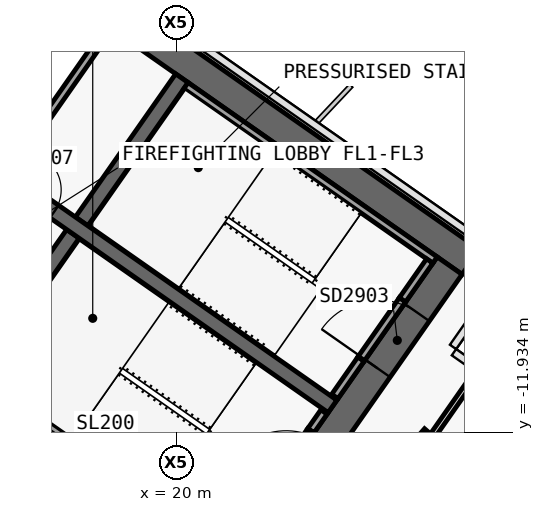
"""IFC4 building model, lengths in metres.
Left out: names, types, materials, properties, quantities, classifications, styles, units other than length and angle.
Written with IfcOpenShell. Run it as: python <this file> out.ifc"""

import sys

from ifc_helpers import new_model, si_unit, direction, frame, frame_2d, origin, place, context, subcontext, project, spatial, polyline, rectangle, outline, extrude, element, fill, save


model = new_model("IFC4")
c1 = context("Model", 3, precision=1e-05, world=origin(), true_north=direction((0.0, 1.0)))
c2 = subcontext(c1, "Body", "Model", "MODEL_VIEW")
j1 = project(units=[si_unit("LENGTHUNIT", "METRE"), si_unit("PLANEANGLEUNIT", "RADIAN")], contexts=[c1])
p1 = place(None, origin())
s1 = spatial("IfcSite", under=j1, at=p1, CompositionType="ELEMENT")
p2 = place(p1, origin())
s2 = spatial("IfcBuilding", under=s1, at=p2, CompositionType="ELEMENT")
p3 = place(p2, frame((0.0, 0.0, 163.2)))
s3 = spatial("IfcBuildingStorey", under=s2, at=p3, CompositionType="ELEMENT", Elevation=163.2)
p4 = place(p3, frame((-0.029, 11.984, 0.0), z_axis=(0.0, 0.0, 1.0), x_axis=(0.819151382952, -0.573577380837, 0.0)))
e1 = element("IfcWall", 1, at=p4, inside=s3, PredefinedType="SHEAR", context=c2, shape_type="SweptSolid", body=[
    extrude(outline(polyline([(33.898, 0.4), (-0.0, 0.4), (0.56, -0.4), (33.898, -0.4), (33.898, 0.4)])), origin(), (0.0, 0.0, 1.0), 3.9),
])
p5 = place(p3, frame((-0.029, -0.712, 0.0), z_axis=(0.0, 0.0, 1.0), x_axis=(0.819151758019, -0.573576845187, 0.0)))
e2 = element("IfcWall", 2, at=p5, inside=s3, PredefinedType="SHEAR", context=c2, shape_type="SweptSolid", body=[
    extrude(outline(polyline([(26.616, 0.4), (-0.0, 0.4), (0.56, -0.4), (26.616, -0.4), (26.616, 0.4)])), origin(), (0.0, 0.0, 1.0), 3.9),
])
p6 = place(p5, frame((6.666, 0.0, 0.0)))
e3 = element("IfcOpeningElement", 3, at=p6, cuts=e2, PredefinedType="OPENING", context=c2, shape_type="SweptSolid", body=[
    extrude(rectangle(XDim=1.5, YDim=2.1, at=frame_2d((0.75, 1.05))), frame((0.0, 0.41, 0.0), z_axis=(0.0, -1.0, 0.0), x_axis=(1.0, 0.0, 0.0)), (0.0, 0.0, 1.0), 0.82),
])
p7 = place(p5, frame((12.366, 0.0, 0.0)))
e4 = element("IfcOpeningElement", 4, at=p7, cuts=e2, PredefinedType="OPENING", context=c2, shape_type="SweptSolid", body=[
    extrude(rectangle(XDim=1.5, YDim=2.1, at=frame_2d((0.75, 1.05))), frame((0.0, 0.41, 0.0), z_axis=(0.0, -1.0, 0.0), x_axis=(1.0, 0.0, 0.0)), (0.0, 0.0, 1.0), 0.82),
])
p8 = place(p3, frame((21.675, -15.421, 0.0), z_axis=(0.0, 0.0, 1.0), x_axis=(0.573581815061, 0.819148278049, 0.0)))
e5 = element("IfcWall", 5, at=p8, inside=s3, PredefinedType="SHEAR", context=c2, shape_type="SweptSolid", body=[
    extrude(outline(polyline([(9.6, 0.4), (0.0, 0.4), (0.0, -0.4), (9.6, -0.4), (9.6, 0.4)])), origin(), (0.0, 0.0, 1.0), 3.9),
])
p9 = place(p8, frame((6.3, 0.0, 0.0)))
e6 = element("IfcOpeningElement", 6, at=p9, cuts=e5, PredefinedType="OPENING", context=c2, shape_type="SweptSolid", body=[
    extrude(rectangle(XDim=1.8, YDim=2.1, at=frame_2d((0.9, 1.05))), frame((0.0, 0.41, 0.0), z_axis=(0.0, -1.0, 0.0), x_axis=(1.0, 0.0, 0.0)), (0.0, 0.0, 1.0), 0.82),
])
p10 = place(p8, frame((2.1, 0.0, 0.0)))
e7 = element("IfcOpeningElement", 7, at=p10, cuts=e5, PredefinedType="OPENING", context=c2, shape_type="SweptSolid", body=[
    extrude(rectangle(XDim=1.8, YDim=2.1, at=frame_2d((0.9, 1.05))), frame((0.0, 0.41, 0.0), z_axis=(0.0, -1.0, 0.0), x_axis=(1.0, 0.0, 0.0)), (0.0, 0.0, 1.0), 0.82),
])
p11 = place(p3, frame((14.63, -10.488, 0.0), z_axis=(0.0, 0.0, 1.0), x_axis=(0.573611936273, 0.819127185829, 0.0)))
e8 = element("IfcWall", 8, at=p11, inside=s3, PredefinedType="SHEAR", context=c2, shape_type="SweptSolid", body=[
    extrude(outline(polyline([(0.0, 0.2), (0.0, -0.2), (4.6, -0.2), (4.6, 0.2), (0.0, 0.2)])), origin(), (0.0, 0.0, 1.0), 3.9),
])
p12 = place(p3, frame((17.498, -6.392, 0.0), z_axis=(0.0, 0.0, 1.0), x_axis=(0.573611936273, 0.819127185829, 0.0)))
e9 = element("IfcWall", 9, at=p12, inside=s3, PredefinedType="SHEAR", context=c2, shape_type="SweptSolid", body=[
    extrude(outline(polyline([(4.6, -0.2), (4.6, 0.2), (0.0, 0.2), (0.0, -0.2), (4.6, -0.2)])), origin(), (0.0, 0.0, 1.0), 3.9),
])
p13 = place(p3, frame((2.638, 3.768, 0.0), z_axis=(0.0, 0.0, 1.0), x_axis=(0.81915267502, -0.573575535572, 0.0)))
e10 = element("IfcWall", 10, at=p13, inside=s3, PredefinedType="SHEAR", context=c2, shape_type="SweptSolid", body=[
    extrude(outline(polyline([(0.0, 0.2), (0.0, -0.2), (26.2, -0.2), (26.2, 0.2), (0.0, 0.2)])), origin(), (0.0, 0.0, 1.0), 3.9),
])
p14 = place(p13, frame((9.637, 0.0, 0.0)))
e11 = element("IfcOpeningElement", 11, at=p14, cuts=e10, PredefinedType="OPENING", context=c2, shape_type="SweptSolid", body=[
    extrude(rectangle(XDim=1.2, YDim=2.1, at=frame_2d((0.6, 1.05))), frame((0.0, 0.21, 0.0), z_axis=(0.0, -1.0, 0.0), x_axis=(1.0, 0.0, 0.0)), (0.0, 0.0, 1.0), 0.42),
])
p15 = place(p13, frame((11.812, 0.0, 0.0)))
e12 = element("IfcOpeningElement", 12, at=p15, cuts=e10, PredefinedType="OPENING", context=c2, shape_type="SweptSolid", body=[
    extrude(rectangle(XDim=1.2, YDim=2.1, at=frame_2d((0.6, 1.05))), frame((0.0, 0.21, 0.0), z_axis=(0.0, -1.0, 0.0), x_axis=(1.0, 0.0, 0.0)), (0.0, 0.0, 1.0), 0.42),
])
p16 = place(p13, frame((13.988, 0.0, 0.0)))
e13 = element("IfcOpeningElement", 13, at=p16, cuts=e10, PredefinedType="OPENING", context=c2, shape_type="SweptSolid", body=[
    extrude(rectangle(XDim=1.2, YDim=2.1, at=frame_2d((0.6, 1.05))), frame((0.0, 0.21, 0.0), z_axis=(0.0, -1.0, 0.0), x_axis=(1.0, 0.0, 0.0)), (0.0, 0.0, 1.0), 0.42),
])
p17 = place(p13, frame((16.262, 0.0, 0.0)))
e14 = element("IfcOpeningElement", 14, at=p17, cuts=e10, PredefinedType="OPENING", context=c2, shape_type="SweptSolid", body=[
    extrude(rectangle(XDim=1.0, YDim=2.1, at=frame_2d((0.5, 1.05))), frame((0.0, 0.21, 0.0), z_axis=(0.0, -1.0, 0.0), x_axis=(1.0, 0.0, 0.0)), (0.0, 0.0, 1.0), 0.42),
])
p18 = place(p3, frame((15.594, -5.059, 0.0), z_axis=(0.0, 0.0, 1.0), x_axis=(0.573540709186, 0.819177059558, 0.0)))
e15 = element("IfcWall", 15, at=p18, inside=s3, PredefinedType="SOLIDWALL", context=c2, shape_type="SweptSolid", body=[
    extrude(rectangle(XDim=4.6, YDim=0.2, at=frame_2d((2.3, 0.0))), origin(), (0.0, 0.0, 1.0), 3.9),
])
p19 = place(p3, frame((20.243, -2.821, 0.0), z_axis=(0.0, 0.0, 1.0), x_axis=(0.819141584393, -0.57359137434, 0.0)))
e16 = element("IfcWall", 16, at=p19, inside=s3, PredefinedType="SOLIDWALL", context=c2, shape_type="SweptSolid", body=[
    extrude(rectangle(XDim=8.0, YDim=0.2, at=frame_2d((4.0, 0.0))), origin(), (0.0, 0.0, 1.0), 3.62),
])
p20 = place(p3, frame((24.162, -10.998, 0.0), z_axis=(0.0, 0.0, 1.0), x_axis=(0.573612502218, 0.819126789514, 0.0)))
e17 = element("IfcWall", 17, at=p20, inside=s3, PredefinedType="SOLIDWALL", context=c2, shape_type="SweptSolid", body=[
    extrude(rectangle(XDim=1.2, YDim=0.2, at=frame_2d((0.6, 0.0))), origin(), (0.0, 0.0, 1.0), 3.62),
])
p21 = place(p3, frame((25.94, -8.458, 0.0), z_axis=(0.0, 0.0, 1.0), x_axis=(0.573619628835, 0.819121798889, 0.0)))
e18 = element("IfcWall", 18, at=p21, inside=s3, PredefinedType="SOLIDWALL", context=c2, shape_type="SweptSolid", body=[
    extrude(rectangle(XDim=1.25, YDim=0.2, at=frame_2d((0.625, 0.0))), origin(), (0.0, 0.0, 1.0), 3.62),
])
p22 = place(p3, frame((24.85, -10.014, 2.15), z_axis=(0.0, 0.0, 1.0), x_axis=(0.573505465124, 0.819201734296, 0.0)))
e19 = element("IfcWall", 19, at=p22, inside=s3, PredefinedType="SOLIDWALL", context=c2, shape_type="SweptSolid", body=[
    extrude(rectangle(XDim=1.9, YDim=0.2, at=frame_2d((0.95, 0.0))), origin(), (0.0, 0.0, 1.0), 1.47),
])
p23 = place(p3, frame((14.851, -10.521, 0.0), z_axis=(0.0, 0.0, 1.0), x_axis=(0.819141584393, -0.57359137434, 0.0)))
e20 = element("IfcWall", 20, at=p23, inside=s3, PredefinedType="SOLIDWALL", context=c2, shape_type="SweptSolid", body=[
    extrude(rectangle(XDim=8.0, YDim=0.2, at=frame_2d((4.0, 0.0))), origin(), (0.0, 0.0, 1.0), 3.62),
])
p24 = place(p3, frame((23.531, -11.898, 0.0), z_axis=(0.0, 0.0, 1.0), x_axis=(0.573708088123, 0.819059844958, 0.0)))
e21 = element("IfcWall", 21, at=p24, inside=s3, PredefinedType="SOLIDWALL", context=c2, shape_type="SweptSolid", body=[
    extrude(rectangle(XDim=0.6, YDim=0.2, at=frame_2d((0.3, 0.0))), origin(), (0.0, 0.0, 1.0), 3.62),
])
p25 = place(p3, frame((22.441, -13.455, 2.15), z_axis=(0.0, 0.0, 1.0), x_axis=(0.573591692345, 0.819141361715, 0.0)))
e22 = element("IfcWall", 22, at=p25, inside=s3, PredefinedType="SOLIDWALL", context=c2, shape_type="SweptSolid", body=[
    extrude(rectangle(XDim=1.9, YDim=0.2, at=frame_2d((0.95, 0.0))), origin(), (0.0, 0.0, 1.0), 1.47),
])
p26 = place(p3, frame((18.055, -16.061, 0.0), z_axis=(0.0, 0.0, 1.0), x_axis=(-0.819164661457, 0.573558416746, 0.0)))
e23 = element("IfcWall", 23, at=p26, inside=s3, PredefinedType="PARTITIONING", context=c2, shape_type="SweptSolid", body=[
    extrude(rectangle(XDim=7.504, YDim=0.15, at=frame_2d((3.752, 0.0))), origin(), (0.0, 0.0, 1.0), 3.0),
])
p27 = place(p26, frame((2.952, 0.0, 0.0)))
e24 = element("IfcOpeningElement", 24, at=p27, cuts=e23, PredefinedType="OPENING", context=c2, shape_type="SweptSolid", body=[
    extrude(rectangle(XDim=1.6, YDim=2.1, at=frame_2d((0.8, 1.05))), frame((0.0, 0.085, 0.0), z_axis=(0.0, -1.0, 0.0), x_axis=(1.0, 0.0, 0.0)), (0.0, 0.0, 1.0), 0.17),
])
p28 = place(p3, frame((28.876, -11.064, 0.0), z_axis=(0.0, 0.0, 1.0), x_axis=(-0.573591492816, -0.819141501433, 0.0)))
e25 = element("IfcWall", 25, at=p28, inside=s3, PredefinedType="PARTITIONING", context=c2, shape_type="SweptSolid", body=[
    extrude(rectangle(XDim=8.5, YDim=0.15, at=frame_2d((4.25, 0.0))), origin(), (0.0, 0.0, 1.0), 3.0),
])
p29 = place(p3, frame((22.285, -16.825, 0.0), z_axis=(0.0, 0.0, 1.0), x_axis=(0.656781429942, 0.754080999153, 0.0)))
e26 = element("IfcWall", 26, at=p29, inside=s3, PredefinedType="PARTITIONING", context=c2, shape_type="SweptSolid", body=[
    extrude(rectangle(XDim=6.536, YDim=0.15, at=frame_2d((3.268, 0.0))), origin(), (0.0, 0.0, 1.0), 3.0),
])
p30 = place(p3, frame((26.746, -12.014, 0.0), z_axis=(0.0, 0.0, 1.0), x_axis=(0.573568836472, 0.819157365729, 0.0)))
e27 = element("IfcWall", 27, at=p30, inside=s3, PredefinedType="PARTITIONING", context=c2, shape_type="SweptSolid", body=[
    extrude(rectangle(XDim=2.0, YDim=0.15, at=frame_2d((1.0, 0.0))), origin(), (0.0, 0.0, 1.0), 3.0),
])
p31 = place(p17, origin())
e28 = element("IfcDoor", 28, at=p31, inside=s3, OperationType="SINGLE_SWING_RIGHT", PredefinedType="DOOR", context=c2, shape_type="SweptSolid", body=[
    extrude(rectangle(XDim=1.0, YDim=2.1, at=frame_2d((0.5, 1.05))), frame((0.0, 0.025, 0.0), z_axis=(0.0, -1.0, 0.0), x_axis=(1.0, 0.0, 0.0)), (0.0, 0.0, 1.0), 0.05),
])
fill(e14, e28)
p32 = place(p9, origin())
e29 = element("IfcDoor", 29, at=p32, inside=s3, OperationType="DOUBLE_DOOR_SINGLE_SWING", PredefinedType="DOOR", context=c2, shape_type="SweptSolid", body=[
    extrude(rectangle(XDim=1.8, YDim=2.1, at=frame_2d((0.9, 1.05))), frame((0.0, 0.025, 0.0), z_axis=(0.0, -1.0, 0.0), x_axis=(1.0, 0.0, 0.0)), (0.0, 0.0, 1.0), 0.05),
])
fill(e6, e29)
save(model, sys.argv[1])
